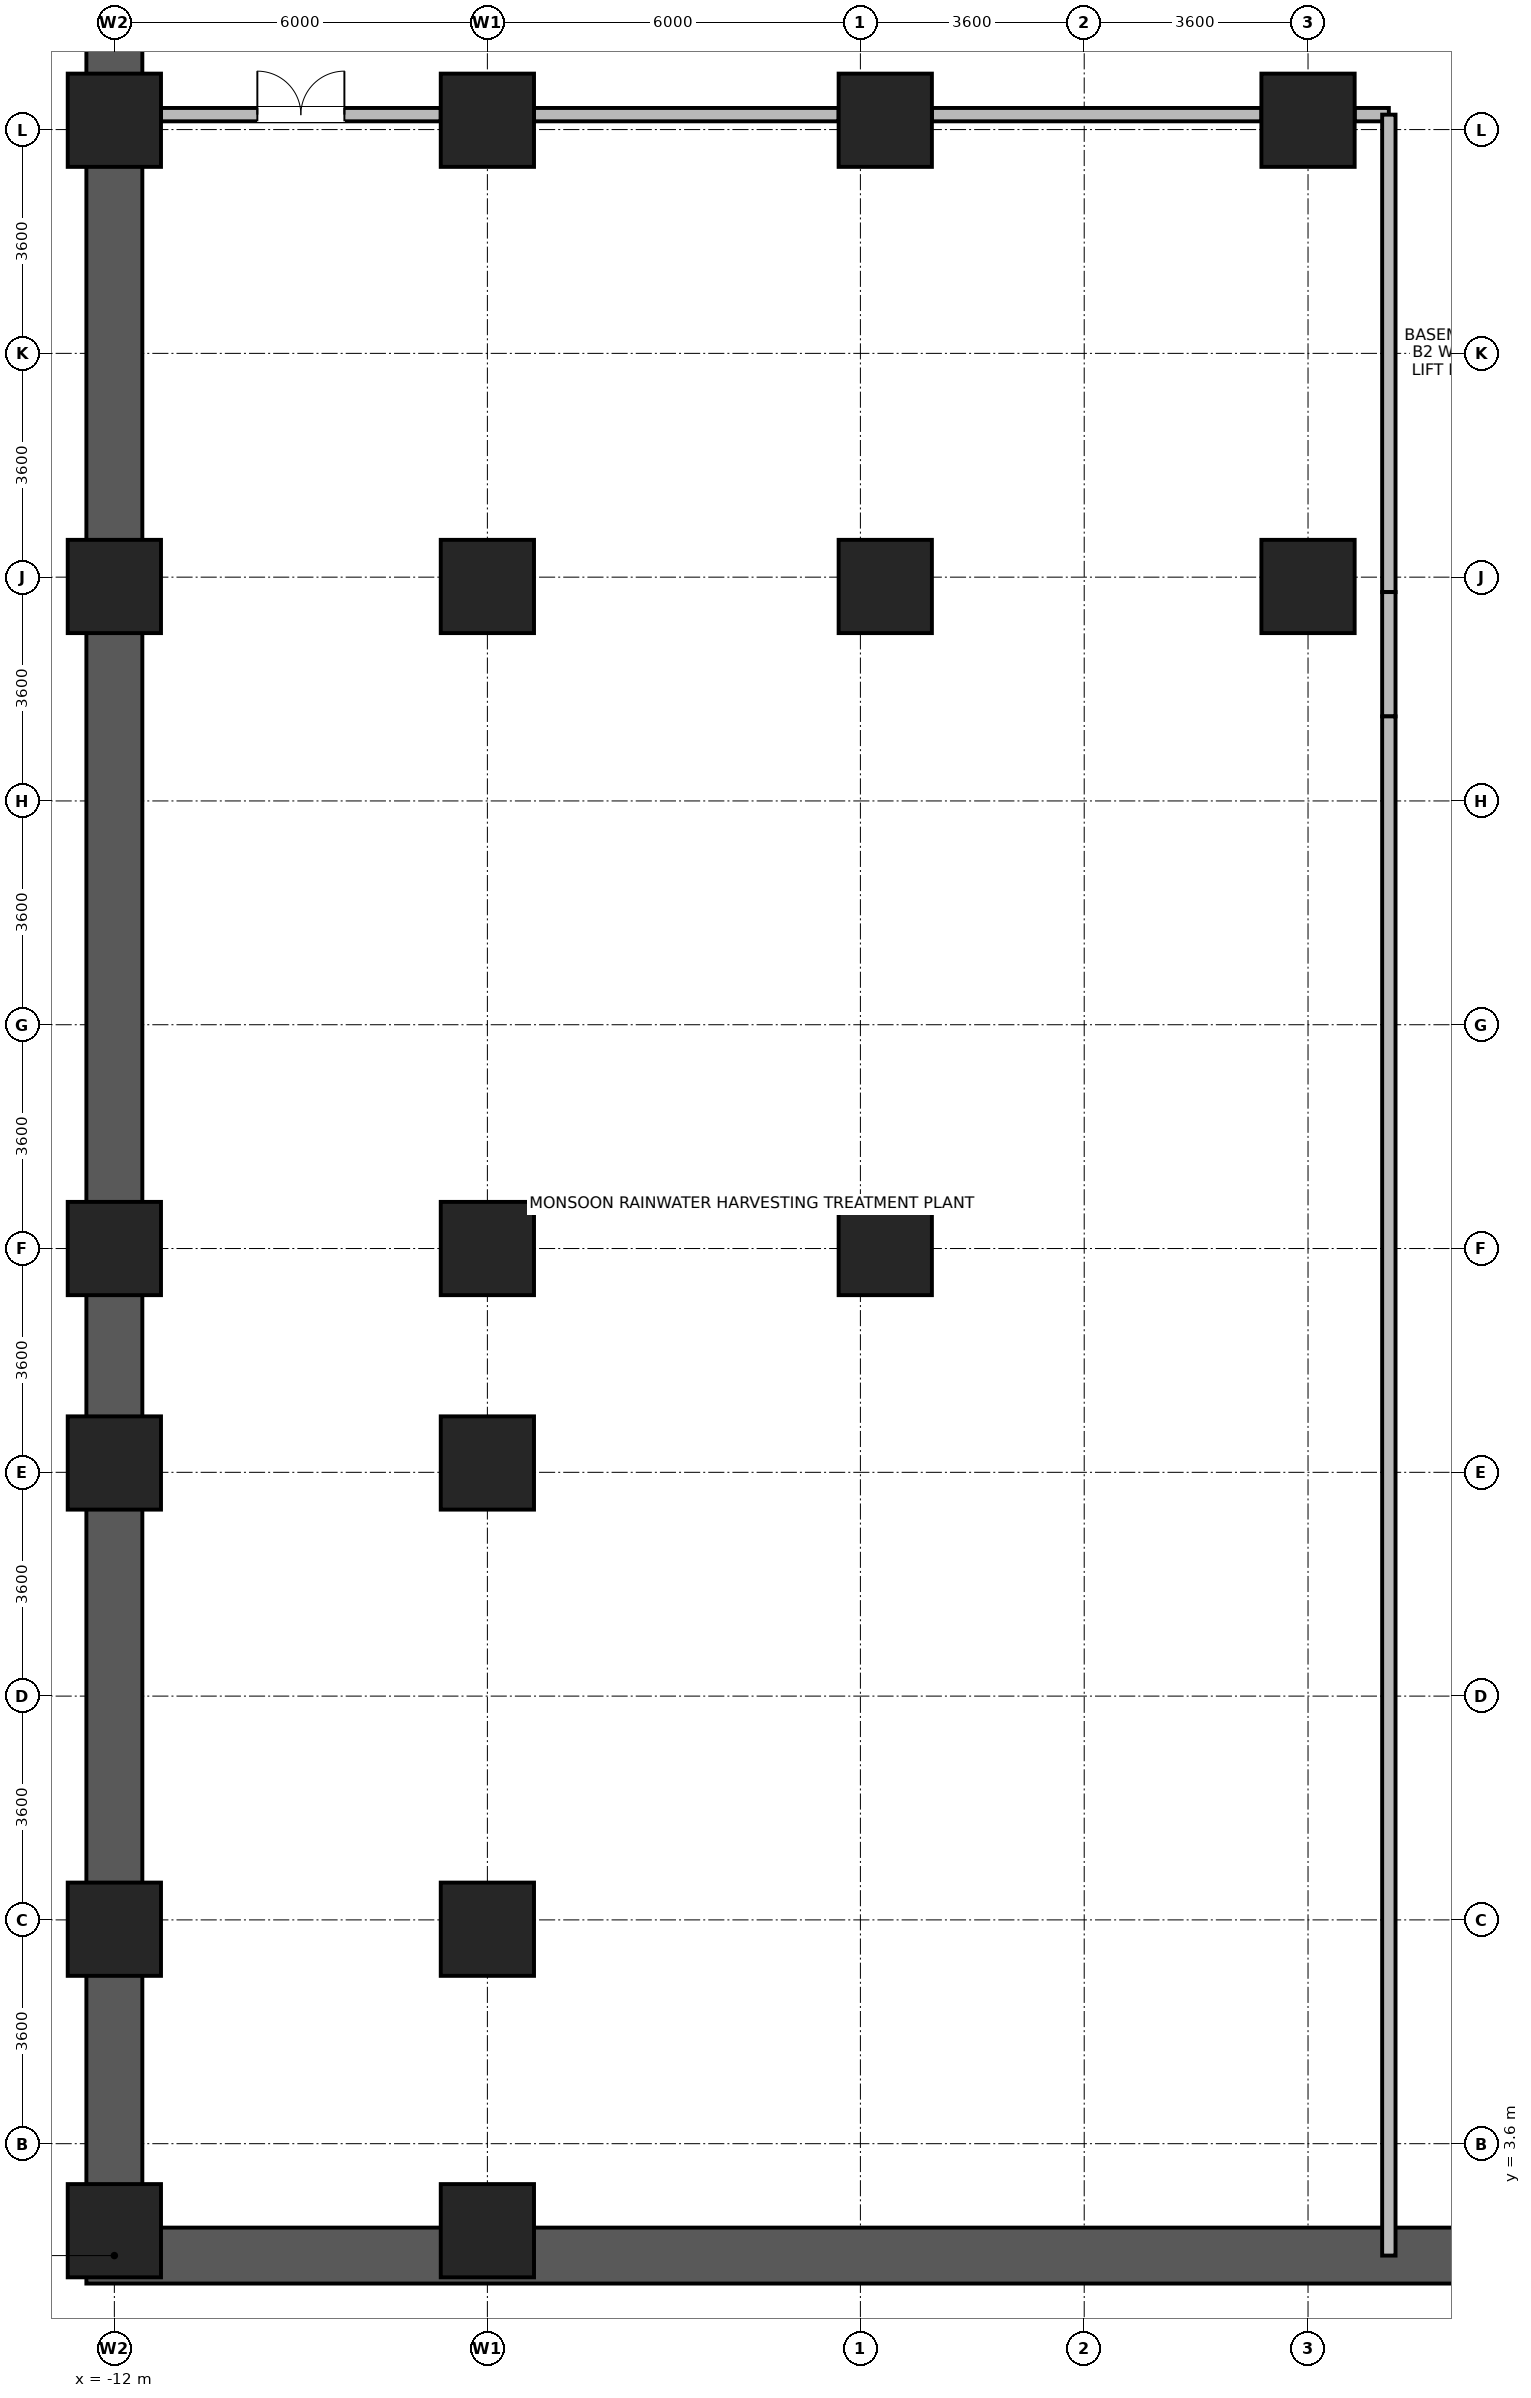
"""IFC4 building model, lengths in metres.
Left out: names, types, materials, properties, quantities, classifications, styles, units other than length and angle.
Written with IfcOpenShell. Run it as: python <this file> out.ifc"""

import sys

from ifc_helpers import new_model, si_unit, direction, frame, frame_2d, origin, origin_2d, place, context, subcontext, project, spatial, rectangle, extrude, source, transform, mapped, element, fill, save


model = new_model("IFC4")
c1 = context("Model", 3, precision=1e-05, world=origin(), true_north=direction((0.0, 1.0)))
c2 = subcontext(c1, "Body", "Model", "MODEL_VIEW")
j1 = project(units=[si_unit("LENGTHUNIT", "METRE"), si_unit("PLANEANGLEUNIT", "RADIAN")], contexts=[c1])
p1 = place(None, origin())
s1 = spatial("IfcSite", under=j1, at=p1, CompositionType="ELEMENT")
p2 = place(p1, origin())
s2 = spatial("IfcBuilding", under=s1, at=p2, CompositionType="ELEMENT")
p3 = place(p2, frame((0.0, 0.0, -9.0)))
s3 = spatial("IfcBuildingStorey", under=s2, at=p3, CompositionType="ELEMENT", Elevation=-9.0)
p4 = place(p3, frame((-12.45, 1.8, 0.0), z_axis=(0.0, 0.0, 1.0), x_axis=(1.0, 0.0, 0.0)))
e1 = element("IfcWall", 1, at=p4, inside=s3, PredefinedType="USERDEFINED", context=c2, shape_type="SweptSolid", body=[
    extrude(rectangle(XDim=86.1, YDim=0.9, at=frame_2d((43.05, 0.0))), origin(), (0.0, 0.0, 1.0), 4.18),
])
p5 = place(p3, frame((-12.0, 2.25, 0.0), z_axis=(0.0, 0.0, 1.0), x_axis=(0.0, 1.0, 0.0)))
e2 = element("IfcWall", 2, at=p5, inside=s3, PredefinedType="USERDEFINED", context=c2, shape_type="SweptSolid", body=[
    extrude(rectangle(XDim=42.15, YDim=0.9, at=frame_2d((21.075, 0.0))), origin(), (0.0, 0.0, 1.0), 4.18),
])
m1 = source(origin(), c2, "Body", "SweptSolid", [
    extrude(rectangle(XDim=1.5, YDim=1.5, at=origin_2d()), origin(), (0.0, 0.0, 1.0), 4.5),
])
for number, where, z_axis, x_axis in (
    (3, (7.2, 28.65, 0.0), (0.0, 0.0, 1.0), (1.0, 0.0, 0.0)),
    (4, (7.2, 36.15, 0.0), (0.0, 0.0, 1.0), (1.0, 0.0, 0.0)),
    (5, (0.4, 18.0, 0.0), (0.0, 0.0, 1.0), (1.0, 0.0, 0.0)),
    (6, (0.4, 28.65, 0.0), (0.0, 0.0, 1.0), (1.0, 0.0, 0.0)),
    (7, (0.4, 36.15, 0.0), (0.0, 0.0, 1.0), (1.0, 0.0, 0.0)),
    (8, (-12.0, 18.0, 0.0), (0.0, 0.0, 1.0), (1.0, 0.0, 0.0)),
    (9, (-12.0, 28.65, 0.0), (0.0, 0.0, 1.0), (1.0, 0.0, 0.0)),
    (10, (-12.0, 36.15, 0.0), (0.0, 0.0, 1.0), (1.0, 0.0, 0.0)),
    (11, (-6.0, 18.0, 0.0), (0.0, 0.0, 1.0), (1.0, 0.0, 0.0)),
    (12, (-6.0, 28.65, 0.0), (0.0, 0.0, 1.0), (1.0, 0.0, 0.0)),
    (13, (-6.0, 36.15, 0.0), (0.0, 0.0, 1.0), (1.0, 0.0, 0.0)),
    (14, (-12.0, 2.2, 0.0), (0.0, 0.0, 1.0), (1.0, 0.0, 0.0)),
    (15, (-6.0, 2.2, 0.0), (0.0, 0.0, 1.0), (1.0, 0.0, 0.0)),
    (16, (-12.0, 7.05, 0.0), (0.0, 0.0, 1.0), (1.0, 0.0, 0.0)),
    (17, (-6.0, 7.05, 0.0), (0.0, 0.0, 1.0), (1.0, 0.0, 0.0)),
    (18, (-12.0, 14.55, 0.0), (0.0, 0.0, 1.0), (1.0, 0.0, 0.0)),
    (19, (-6.0, 14.55, 0.0), (0.0, 0.0, 1.0), (1.0, 0.0, 0.0)),
):
    element("IfcColumn", number, at=place(p3, frame(where, z_axis=z_axis, x_axis=x_axis)), inside=s3, PredefinedType="COLUMN", context=c2, shape_type="MappedRepresentation", body=[
        mapped(m1, transform((0.0, 0.0, 0.0), x_axis=(1.0, 0.0, 0.0), y_axis=(0.0, 1.0, 0.0), z_axis=(0.0, 0.0, 1.0), scale=1.0)),
    ])
p6 = place(p3, frame((-11.25, 36.24, 0.0), z_axis=(0.0, 0.0, 1.0), x_axis=(1.0, 0.0, 0.0)))
e20 = element("IfcWall", 20, at=p6, inside=s3, PredefinedType="PARTITIONING", context=c2, shape_type="SweptSolid", body=[
    extrude(rectangle(XDim=4.5, YDim=0.215, at=frame_2d((2.25, 0.0))), origin(), (0.0, 0.0, 1.0), 3.46),
])
p7 = place(p6, frame((1.55, 0.0, 0.0)))
e21 = element("IfcOpeningElement", 21, at=p7, cuts=e20, PredefinedType="OPENING", context=c2, shape_type="SweptSolid", body=[
    extrude(rectangle(XDim=1.4, YDim=2.15, at=frame_2d((0.7, 1.075))), frame((0.0, 0.118, 0.0), z_axis=(0.0, -1.0, 0.0), x_axis=(1.0, 0.0, 0.0)), (0.0, 0.0, 1.0), 0.235),
])
p8 = place(p3, frame((-5.25, 36.24, 0.0), z_axis=(0.0, 0.0, 1.0), x_axis=(1.0, 0.0, 0.0)))
e22 = element("IfcWall", 22, at=p8, inside=s3, PredefinedType="PARTITIONING", context=c2, shape_type="SweptSolid", body=[
    extrude(rectangle(XDim=4.9, YDim=0.215, at=frame_2d((2.45, 0.0))), origin(), (0.0, 0.0, 1.0), 3.46),
])
p9 = place(p3, frame((1.15, 36.24, 0.0), z_axis=(0.0, 0.0, 1.0), x_axis=(1.0, 0.0, 0.0)))
e23 = element("IfcWall", 23, at=p9, inside=s3, PredefinedType="PARTITIONING", context=c2, shape_type="SweptSolid", body=[
    extrude(rectangle(XDim=5.3, YDim=0.215, at=frame_2d((2.65, 0.0))), origin(), (0.0, 0.0, 1.0), 3.46),
])
p10 = place(p3, frame((7.95, 36.24, 0.0), z_axis=(0.0, 0.0, 1.0), x_axis=(1.0, 0.0, 0.0)))
e24 = element("IfcWall", 24, at=p10, inside=s3, PredefinedType="PARTITIONING", context=c2, shape_type="SweptSolid", body=[
    extrude(rectangle(XDim=0.55, YDim=0.215, at=frame_2d((0.275, 0.0))), origin(), (0.0, 0.0, 1.0), 3.46),
])
p11 = place(p3, frame((8.5, 28.56, 0.0), z_axis=(0.0, 0.0, 1.0), x_axis=(0.0, 1.0, 0.0)))
e25 = element("IfcWall", 25, at=p11, inside=s3, PredefinedType="PARTITIONING", context=c2, shape_type="SweptSolid", body=[
    extrude(rectangle(XDim=7.68, YDim=0.215, at=frame_2d((3.84, 0.0))), origin(), (0.0, 0.0, 1.0), 4.16),
])
p12 = place(p3, frame((8.5, 26.56, 0.0), z_axis=(0.0, 0.0, 1.0), x_axis=(0.0, 1.0, 0.0)))
e26 = element("IfcWall", 26, at=p12, inside=s3, PredefinedType="PARTITIONING", context=c2, shape_type="SweptSolid", body=[
    extrude(rectangle(XDim=2.0, YDim=0.215, at=frame_2d((1.0, 0.0))), origin(), (0.0, 0.0, 1.0), 4.16),
])
p13 = place(p3, frame((8.5, 1.8, 0.0), z_axis=(0.0, 0.0, 1.0), x_axis=(0.0, 1.0, 0.0)))
e27 = element("IfcWall", 27, at=p13, inside=s3, PredefinedType="PARTITIONING", context=c2, shape_type="SweptSolid", body=[
    extrude(rectangle(XDim=24.76, YDim=0.215, at=frame_2d((12.38, 0.0))), origin(), (0.0, 0.0, 1.0), 4.16),
])
p14 = place(p7, origin())
e28 = element("IfcDoor", 28, at=p14, inside=s3, OperationType="DOUBLE_DOOR_SINGLE_SWING", PredefinedType="DOOR", context=c2, shape_type="SweptSolid", body=[
    extrude(rectangle(XDim=1.4, YDim=2.15, at=frame_2d((0.7, 1.075))), frame((0.0, 0.025, 0.0), z_axis=(0.0, -1.0, 0.0), x_axis=(1.0, 0.0, 0.0)), (0.0, 0.0, 1.0), 0.05),
])
fill(e21, e28)
save(model, sys.argv[1])
